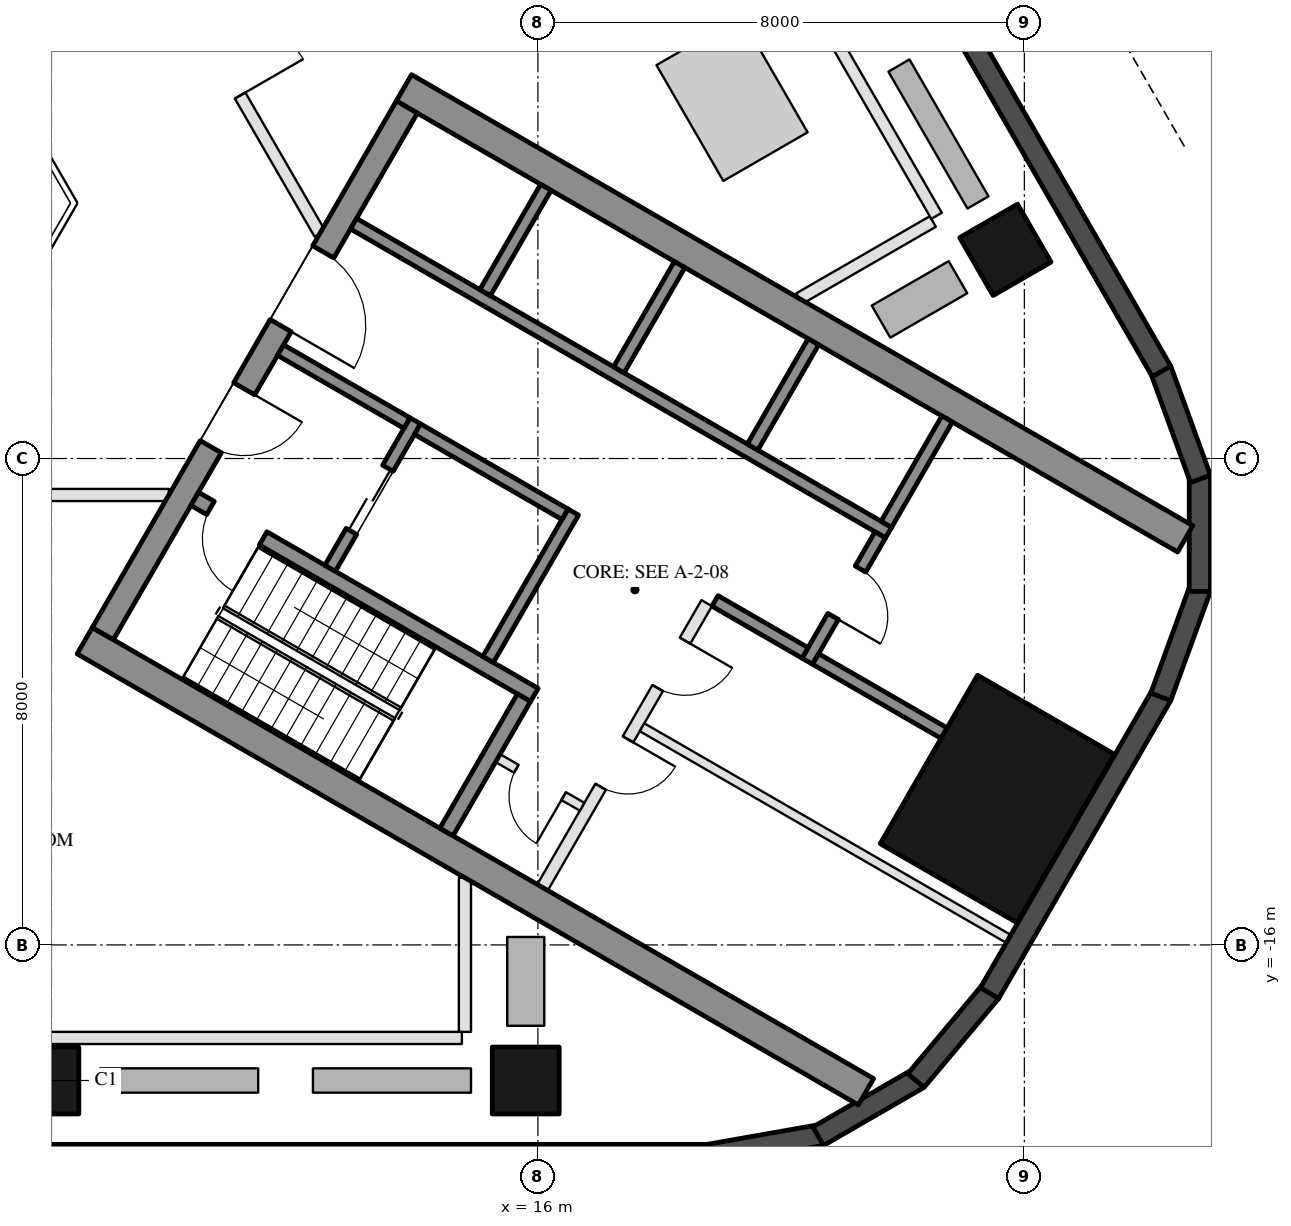
"""IFC4 building model, lengths in metres.
Left out: names, types, materials, properties, quantities, classifications, styles, units other than length and angle.
Written with IfcOpenShell. Run it as: python <this file> out.ifc"""

import sys

from ifc_helpers import new_model, si_unit, direction, frame, frame_2d, origin, origin_2d, place, context, subcontext, project, spatial, rectangle, hollow_rectangle, extrude, element, fill, save


model = new_model("IFC4")
c1 = context("Model", 3, precision=1e-05, world=origin(), true_north=direction((0.0, 1.0)))
c2 = subcontext(c1, "Body", "Model", "MODEL_VIEW")
j1 = project(units=[si_unit("LENGTHUNIT", "METRE"), si_unit("PLANEANGLEUNIT", "RADIAN")], contexts=[c1])
p1 = place(None, origin())
s1 = spatial("IfcSite", under=j1, at=p1, CompositionType="ELEMENT")
p2 = place(p1, origin())
s2 = spatial("IfcBuilding", under=s1, at=p2, CompositionType="ELEMENT")
p3 = place(p2, frame((0.0, 0.0, 42.0)))
s3 = spatial("IfcBuildingStorey", under=s2, at=p3, CompositionType="ELEMENT", Elevation=42.0)
for number, where, z_axis, x_axis in (
    (1, (7.9, -18.23, 0.0), (0.0, 0.0, 1.0), (-1.0, 0.0, 0.0)),
    (2, (15.8, -18.23, 0.0), (0.0, 0.0, 1.0), (-1.0, 0.0, 0.0)),
    (3, (23.688, -4.568, 0.0), (0.0, 0.0, 1.0), (-0.5, 0.866, 0.0)),
):
    element("IfcColumn", number, at=place(p3, frame(where, z_axis=z_axis, x_axis=x_axis)), inside=s3, PredefinedType="COLUMN", context=c2, shape_type="SweptSolid", body=[
        extrude(hollow_rectangle(XDim=1.1, YDim=1.1, WallThickness=0.05, at=origin_2d()), origin(), (0.0, 0.0, 1.0), 4.5),
    ])
p4 = place(p3, frame((23.556, -13.6, 0.0), z_axis=(0.0, 0.0, 1.0), x_axis=(0.5, 0.866025403784, 0.0)))
e4 = element("IfcColumn", 4, at=p4, inside=s3, PredefinedType="COLUMN", context=c2, shape_type="SweptSolid", body=[
    extrude(hollow_rectangle(XDim=3.2, YDim=2.6, WallThickness=0.08, at=origin_2d()), origin(), (0.0, 0.0, 1.0), 4.5),
])
p5 = place(p3, frame((-18.816, -19.455, 0.0), z_axis=(0.0, 0.0, 1.0), x_axis=(1.0, 0.0, 0.0)))
e5 = element("IfcWall", 5, at=p5, inside=s3, PredefinedType="SOLIDWALL", context=c2, shape_type="SweptSolid", body=[
    extrude(rectangle(XDim=37.632, YDim=0.35, at=frame_2d((18.816, 0.0))), origin(), (0.0, 0.0, 1.0), 4.35),
])
p6 = place(p3, frame((18.785, -19.458, 0.0), z_axis=(0.0, 0.0, 1.0), x_axis=(0.984798995425, 0.173697837091, 0.0)))
e6 = element("IfcWall", 6, at=p6, inside=s3, PredefinedType="SOLIDWALL", context=c2, shape_type="SweptSolid", body=[
    extrude(rectangle(XDim=1.91, YDim=0.35, at=frame_2d((0.955, 0.0))), origin(), (0.0, 0.0, 1.0), 4.35),
])
for number, where, z_axis, x_axis in (
    (7, (20.61, -19.147, 0.0), (0.0, 0.0, 1.0), (0.866, 0.5, 0.0)),
    (8, (22.217, -18.231, 0.0), (0.0, 0.0, 1.0), (0.643, 0.766, 0.0)),
):
    element("IfcWall", number, at=place(p3, frame(where, z_axis=z_axis, x_axis=x_axis)), inside=s3, PredefinedType="SOLIDWALL", context=c2, shape_type="SweptSolid", body=[
        extrude(rectangle(XDim=1.91, YDim=0.35, at=frame_2d((0.955, 0.0))), origin(), (0.0, 0.0, 1.0), 4.35),
    ])
p7 = place(p3, frame((23.427, -16.792, 0.0), z_axis=(0.0, 0.0, 1.0), x_axis=(0.499986410639, 0.866033249463, 0.0)))
e9 = element("IfcWall", 9, at=p7, inside=s3, PredefinedType="SOLIDWALL", context=c2, shape_type="SweptSolid", body=[
    extrude(rectangle(XDim=5.658, YDim=0.35, at=frame_2d((2.829, 0.0))), origin(), (0.0, 0.0, 1.0), 4.35),
])
for number, where, z_axis, x_axis in (
    (10, (26.244, -11.92, 0.0), (0.0, 0.0, 1.0), (0.342, 0.94, 0.0)),
    (11, (26.886, -10.185, 0.0), (0.0, 0.0, 1.0), (0.0, 1.0, 0.0)),
    (12, (26.897, -8.335, 0.0), (0.0, 0.0, 1.0), (-0.342, 0.94, 0.0)),
):
    element("IfcWall", number, at=place(p3, frame(where, z_axis=z_axis, x_axis=x_axis)), inside=s3, PredefinedType="SOLIDWALL", context=c2, shape_type="SweptSolid", body=[
        extrude(rectangle(XDim=1.91, YDim=0.35, at=frame_2d((0.955, 0.0))), origin(), (0.0, 0.0, 1.0), 4.35),
    ])
p8 = place(p3, frame((26.256, -6.567, 0.0), z_axis=(0.0, 0.0, 1.0), x_axis=(-0.499998380999, 0.866026338513, 0.0)))
e13 = element("IfcWall", 13, at=p8, inside=s3, PredefinedType="SOLIDWALL", context=c2, shape_type="SweptSolid", body=[
    extrude(rectangle(XDim=37.631, YDim=0.35, at=frame_2d((18.816, 0.0))), origin(), (0.0, 0.0, 1.0), 4.35),
])
for number, where, z_axis, x_axis in (
    (14, (8.547, -10.997, 0.0), (0.0, 0.0, 1.0), (0.866, -0.5, 0.0)),
    (15, (13.797, -1.903, 0.0), (0.0, 0.0, 1.0), (0.866, -0.5, 0.0)),
):
    element("IfcWall", number, at=place(p3, frame(where, z_axis=z_axis, x_axis=x_axis)), inside=s3, PredefinedType="SHEAR", context=c2, shape_type="SweptSolid", body=[
        extrude(rectangle(XDim=14.837, YDim=0.5, at=frame_2d((7.418, 0.0))), origin(), (0.0, 0.0, 1.0), 4.3),
    ])
p9 = place(p3, frame((8.845, -10.88, 0.0), z_axis=(0.0, 0.0, 1.0), x_axis=(0.500004234368, 0.866022959057, 0.0)))
e16 = element("IfcWall", 16, at=p9, inside=s3, PredefinedType="SHEAR", context=c2, shape_type="SweptSolid", body=[
    extrude(rectangle(XDim=10.0, YDim=0.4, at=frame_2d((5.0, 0.0))), origin(), (0.0, 0.0, 1.0), 4.3),
])
p10 = place(p9, frame((3.55, 0.0, 0.0)))
e17 = element("IfcOpeningElement", 17, at=p10, cuts=e16, PredefinedType="OPENING", context=c2, shape_type="SweptSolid", body=[
    extrude(rectangle(XDim=1.1, YDim=2.1, at=frame_2d((0.55, 1.05))), frame((0.0, 0.21, 0.0), z_axis=(0.0, -1.0, 0.0), x_axis=(1.0, 0.0, 0.0)), (0.0, 0.0, 1.0), 0.42),
])
p11 = place(p9, frame((5.85, 0.0, 0.0)))
e18 = element("IfcOpeningElement", 18, at=p11, cuts=e16, PredefinedType="OPENING", context=c2, shape_type="SweptSolid", body=[
    extrude(rectangle(XDim=1.4, YDim=2.1, at=frame_2d((0.7, 1.05))), frame((0.0, 0.21, 0.0), z_axis=(0.0, -1.0, 0.0), x_axis=(1.0, 0.0, 0.0)), (0.0, 0.0, 1.0), 0.42),
])
p12 = place(p3, frame((10.356, -8.664, 0.0), z_axis=(0.0, 0.0, 1.0), x_axis=(0.866028629588, -0.499994412703, 0.0)))
e19 = element("IfcWall", 19, at=p12, inside=s3, PredefinedType="SHEAR", context=c2, shape_type="SweptSolid", body=[
    extrude(rectangle(XDim=6.45, YDim=0.25, at=frame_2d((3.225, 0.0))), origin(), (0.0, 0.0, 1.0), 4.3),
])
p13 = place(p12, frame((0.3, 0.0, 0.0)))
e20 = element("IfcOpeningElement", 20, at=p13, cuts=e19, PredefinedType="OPENING", context=c2, shape_type="SweptSolid", body=[
    extrude(rectangle(XDim=1.0, YDim=2.1, at=frame_2d((0.5, 1.05))), frame((0.0, 0.135, 0.0), z_axis=(0.0, -1.0, 0.0), x_axis=(1.0, 0.0, 0.0)), (0.0, 0.0, 1.0), 0.27),
])
p14 = place(p3, frame((14.496, -14.143, 0.0), z_axis=(0.0, 0.0, 1.0), x_axis=(0.500062241894, 0.865989465428, 0.0)))
e21 = element("IfcWall", 21, at=p14, inside=s3, PredefinedType="SHEAR", context=c2, shape_type="SweptSolid", body=[
    extrude(rectangle(XDim=2.55, YDim=0.25, at=frame_2d((1.275, 0.0))), origin(), (0.0, 0.0, 1.0), 4.3),
])
p15 = place(p3, frame((15.181, -11.305, 0.0), z_axis=(0.0, 0.0, 1.0), x_axis=(0.49994636267, 0.866056369097, 0.0)))
e22 = element("IfcWall", 22, at=p15, inside=s3, PredefinedType="SHEAR", context=c2, shape_type="SweptSolid", body=[
    extrude(rectangle(XDim=2.8, YDim=0.2, at=frame_2d((1.4, 0.0))), origin(), (0.0, 0.0, 1.0), 4.3),
])
p16 = place(p3, frame((12.583, -9.805, 0.0), z_axis=(0.0, 0.0, 1.0), x_axis=(0.49994636267, 0.866056369097, 0.0)))
e23 = element("IfcWall", 23, at=p16, inside=s3, PredefinedType="SHEAR", context=c2, shape_type="SweptSolid", body=[
    extrude(rectangle(XDim=2.8, YDim=0.2, at=frame_2d((1.4, 0.0))), origin(), (0.0, 0.0, 1.0), 4.3),
])
p17 = place(p16, frame((0.7, 0.0, 0.0)))
e24 = element("IfcOpeningElement", 24, at=p17, cuts=e23, PredefinedType="OPENING", context=c2, shape_type="SweptSolid", body=[
    extrude(rectangle(XDim=1.2, YDim=2.1, at=frame_2d((0.6, 1.05))), frame((0.0, 0.11, 0.0), z_axis=(0.0, -1.0, 0.0), x_axis=(1.0, 0.0, 0.0)), (0.0, 0.0, 1.0), 0.22),
])
p18 = place(p3, frame((11.768, -6.217, 0.0), z_axis=(0.0, 0.0, 1.0), x_axis=(0.866050077142, -0.499957262057, 0.0)))
e25 = element("IfcWall", 25, at=p18, inside=s3, PredefinedType="SHEAR", context=c2, shape_type="SweptSolid", body=[
    extrude(rectangle(XDim=2.4, YDim=0.2, at=frame_2d((1.2, 0.0))), origin(), (0.0, 0.0, 1.0), 4.3),
])
p19 = place(p3, frame((14.02, -7.517, 0.0), z_axis=(0.0, 0.0, 1.0), x_axis=(0.866034573852, -0.49998411664, 0.0)))
e26 = element("IfcWall", 26, at=p19, inside=s3, PredefinedType="SHEAR", context=c2, shape_type="SweptSolid", body=[
    extrude(rectangle(XDim=2.8, YDim=0.2, at=frame_2d((1.4, 0.0))), origin(), (0.0, 0.0, 1.0), 4.3),
])
p20 = place(p3, frame((12.968, -4.138, 0.0), z_axis=(0.0, 0.0, 1.0), x_axis=(0.866028328073, -0.49999493495, 0.0)))
e27 = element("IfcWall", 27, at=p20, inside=s3, PredefinedType="SHEAR", context=c2, shape_type="SweptSolid", body=[
    extrude(rectangle(XDim=10.16, YDim=0.2, at=frame_2d((5.08, 0.0))), origin(), (0.0, 0.0, 1.0), 4.3),
])
p21 = place(p3, frame((20.43, -11.333, 0.0), z_axis=(0.0, 0.0, 1.0), x_axis=(0.500001309137, 0.866024647952, 0.0)))
e28 = element("IfcWall", 28, at=p21, inside=s3, PredefinedType="SHEAR", context=c2, shape_type="SweptSolid", body=[
    extrude(rectangle(XDim=2.4, YDim=0.2, at=frame_2d((1.2, 0.0))), origin(), (0.0, 0.0, 1.0), 4.3),
])
p22 = place(p21, frame((0.85, 0.0, 0.0)))
e29 = element("IfcOpeningElement", 29, at=p22, cuts=e28, PredefinedType="OPENING", context=c2, shape_type="SweptSolid", body=[
    extrude(rectangle(XDim=0.9, YDim=2.1, at=frame_2d((0.45, 1.05))), frame((0.0, 0.11, 0.0), z_axis=(0.0, -1.0, 0.0), x_axis=(1.0, 0.0, 0.0)), (0.0, 0.0, 1.0), 0.22),
])
p23 = place(p3, frame((18.913, -10.342, 0.0), z_axis=(0.0, 0.0, 1.0), x_axis=(0.866038183914, -0.499977863513, 0.0)))
e30 = element("IfcWall", 30, at=p23, inside=s3, PredefinedType="SHEAR", context=c2, shape_type="SweptSolid", body=[
    extrude(rectangle(XDim=1.71, YDim=0.2, at=frame_2d((0.855, 0.0))), origin(), (0.0, 0.0, 1.0), 4.3),
])
for number, where, z_axis, x_axis in (
    (31, (15.131, -5.272, 0.0), (0.0, 0.0, 1.0), (0.5, 0.866, 0.0)),
    (32, (17.331, -6.542, 0.0), (0.0, 0.0, 1.0), (0.5, 0.866, 0.0)),
    (33, (19.531, -7.812, 0.0), (0.0, 0.0, 1.0), (0.5, 0.866, 0.0)),
    (34, (21.73, -9.082, 0.0), (0.0, 0.0, 1.0), (0.5, 0.866, 0.0)),
):
    element("IfcWall", number, at=place(p3, frame(where, z_axis=z_axis, x_axis=x_axis)), inside=s3, PredefinedType="SHEAR", context=c2, shape_type="SweptSolid", body=[
        extrude(rectangle(XDim=2.0, YDim=0.2, at=frame_2d((1.0, 0.0))), origin(), (0.0, 0.0, 1.0), 4.3),
    ])
p24 = place(p3, frame((20.567, -11.297, 0.0), z_axis=(0.0, 0.0, 1.0), x_axis=(0.866048967903, -0.499959183527, 0.0)))
e35 = element("IfcWall", 35, at=p24, inside=s3, PredefinedType="SHEAR", context=c2, shape_type="SweptSolid", body=[
    extrude(rectangle(XDim=2.44, YDim=0.2, at=frame_2d((1.22, 0.0))), origin(), (0.0, 0.0, 1.0), 4.3),
])
p25 = place(p3, frame((16.076, -15.055, 0.0), z_axis=(0.0, 0.0, 1.0), x_axis=(0.499995103361, 0.866028230842, 0.0)))
e36 = element("IfcWall", 36, at=p25, inside=s3, PredefinedType="PARTITIONING", context=c2, shape_type="SweptSolid", body=[
    extrude(rectangle(XDim=5.4, YDim=0.2, at=frame_2d((2.7, 0.0))), origin(), (0.0, 0.0, 1.0), 4.3),
])
p26 = place(p25, frame((1.913, 0.0, 0.0)))
e37 = element("IfcOpeningElement", 37, at=p26, cuts=e36, PredefinedType="OPENING", context=c2, shape_type="SweptSolid", body=[
    extrude(rectangle(XDim=0.9, YDim=2.1, at=frame_2d((0.45, 1.05))), frame((0.0, 0.11, 0.0), z_axis=(0.0, -1.0, 0.0), x_axis=(1.0, 0.0, 0.0)), (0.0, 0.0, 1.0), 0.22),
])
p27 = place(p25, frame((3.788, 0.0, 0.0)))
e38 = element("IfcOpeningElement", 38, at=p27, cuts=e36, PredefinedType="OPENING", context=c2, shape_type="SweptSolid", body=[
    extrude(rectangle(XDim=0.9, YDim=2.1, at=frame_2d((0.45, 1.05))), frame((0.0, 0.11, 0.0), z_axis=(0.0, -1.0, 0.0), x_axis=(1.0, 0.0, 0.0)), (0.0, 0.0, 1.0), 0.22),
])
p28 = place(p3, frame((15.342, -12.928, 0.0), z_axis=(0.0, 0.0, 1.0), x_axis=(0.865989903783, -0.500061482766, 0.0)))
e39 = element("IfcWall", 39, at=p28, inside=s3, PredefinedType="PARTITIONING", context=c2, shape_type="SweptSolid", body=[
    extrude(rectangle(XDim=1.6, YDim=0.15, at=frame_2d((0.8, 0.0))), origin(), (0.0, 0.0, 1.0), 4.3),
])
p29 = place(p28, frame((0.35, 0.0, 0.0)))
e40 = element("IfcOpeningElement", 40, at=p29, cuts=e39, PredefinedType="OPENING", context=c2, shape_type="SweptSolid", body=[
    extrude(rectangle(XDim=0.9, YDim=2.1, at=frame_2d((0.45, 1.05))), frame((0.0, 0.085, 0.0), z_axis=(0.0, -1.0, 0.0), x_axis=(1.0, 0.0, 0.0)), (0.0, 0.0, 1.0), 0.17),
])
p30 = place(p3, frame((17.713, -12.42, 0.0), z_axis=(0.0, 0.0, 1.0), x_axis=(0.866016523273, -0.500015381182, 0.0)))
e41 = element("IfcWall", 41, at=p30, inside=s3, PredefinedType="PARTITIONING", context=c2, shape_type="SweptSolid", body=[
    extrude(rectangle(XDim=6.95, YDim=0.15, at=frame_2d((3.475, 0.0))), origin(), (0.0, 0.0, 1.0), 4.3),
])
p31 = place(p3, frame((14.8, -17.43, 0.0), z_axis=(0.0, 0.0, 1.0), x_axis=(0.0, 1.0, 0.0)))
e42 = element("IfcWall", 42, at=p31, inside=s3, PredefinedType="PARTITIONING", context=c2, shape_type="SweptSolid", body=[
    extrude(rectangle(XDim=2.534, YDim=0.2, at=frame_2d((1.267, 0.0))), origin(), (0.0, 0.0, 1.0), 4.35),
])
p32 = place(p3, frame((-14.75, -17.53, 0.0), z_axis=(0.0, 0.0, 1.0), x_axis=(1.0, 0.0, 0.0)))
e43 = element("IfcWall", 43, at=p32, inside=s3, PredefinedType="PARTITIONING", context=c2, shape_type="SweptSolid", body=[
    extrude(rectangle(XDim=29.5, YDim=0.2, at=frame_2d((14.75, 0.0))), origin(), (0.0, 0.0, 1.0), 3.75),
])
p33 = place(p3, frame((-9.93, -8.6, 0.0), z_axis=(0.0, 0.0, 1.0), x_axis=(1.0, 0.0, 0.0)))
e44 = element("IfcWall", 44, at=p33, inside=s3, PredefinedType="PARTITIONING", context=c2, shape_type="SweptSolid", body=[
    extrude(rectangle(XDim=19.861, YDim=0.2, at=frame_2d((9.93, 0.0))), origin(), (0.0, 0.0, 1.0), 3.75),
])
p34 = place(p33, frame((2.121, 0.0, 0.0)))
e45 = element("IfcOpeningElement", 45, at=p34, cuts=e44, PredefinedType="OPENING", context=c2, shape_type="SweptSolid", body=[
    extrude(rectangle(XDim=1.2, YDim=2.1, at=frame_2d((0.6, 1.05))), frame((0.0, 0.11, 0.0), z_axis=(0.0, -1.0, 0.0), x_axis=(1.0, 0.0, 0.0)), (0.0, 0.0, 1.0), 0.22),
])
p35 = place(p33, frame((8.331, 0.0, 0.0)))
e46 = element("IfcOpeningElement", 46, at=p35, cuts=e44, PredefinedType="OPENING", context=c2, shape_type="SweptSolid", body=[
    extrude(rectangle(XDim=1.2, YDim=2.1, at=frame_2d((0.6, 1.05))), frame((0.0, 0.11, 0.0), z_axis=(0.0, -1.0, 0.0), x_axis=(1.0, 0.0, 0.0)), (0.0, 0.0, 1.0), 0.22),
])
p36 = place(p33, frame((15.54, 0.0, 0.0)))
e47 = element("IfcOpeningElement", 47, at=p36, cuts=e44, PredefinedType="OPENING", context=c2, shape_type="SweptSolid", body=[
    extrude(rectangle(XDim=1.2, YDim=2.1, at=frame_2d((0.6, 1.05))), frame((0.0, 0.11, 0.0), z_axis=(0.0, -1.0, 0.0), x_axis=(1.0, 0.0, 0.0)), (0.0, 0.0, 1.0), 0.22),
])
p37 = place(p3, frame((22.495, -4.102, 0.0), z_axis=(0.0, 0.0, 1.0), x_axis=(-0.866065287345, -0.499930913282, 0.0)))
e48 = element("IfcWall", 48, at=p37, inside=s3, PredefinedType="PARTITIONING", context=c2, shape_type="SweptSolid", body=[
    extrude(rectangle(XDim=2.534, YDim=0.2, at=frame_2d((1.267, 0.0))), origin(), (0.0, 0.0, 1.0), 4.35),
])
p38 = place(p3, frame((22.556, -4.009, 0.0), z_axis=(0.0, 0.0, 1.0), x_axis=(-0.500002084189, 0.866024200474, 0.0)))
e49 = element("IfcWall", 49, at=p38, inside=s3, PredefinedType="PARTITIONING", context=c2, shape_type="SweptSolid", body=[
    extrude(rectangle(XDim=29.5, YDim=0.2, at=frame_2d((14.75, 0.0))), origin(), (0.0, 0.0, 1.0), 3.75),
])
p39 = place(p3, frame((12.413, -4.3, 0.0), z_axis=(0.0, 0.0, 1.0), x_axis=(-0.50000478328, 0.866022642139, 0.0)))
e50 = element("IfcWall", 50, at=p39, inside=s3, PredefinedType="PARTITIONING", context=c2, shape_type="SweptSolid", body=[
    extrude(rectangle(XDim=19.861, YDim=0.2, at=frame_2d((9.931, 0.0))), origin(), (0.0, 0.0, 1.0), 3.75),
])
p40 = place(p39, frame((2.621, 0.0, 0.0)))
e51 = element("IfcOpeningElement", 51, at=p40, cuts=e50, PredefinedType="OPENING", context=c2, shape_type="SweptSolid", body=[
    extrude(rectangle(XDim=1.2, YDim=2.1, at=frame_2d((0.6, 1.05))), frame((0.0, 0.11, 0.0), z_axis=(0.0, -1.0, 0.0), x_axis=(1.0, 0.0, 0.0)), (0.0, 0.0, 1.0), 0.22),
])
p41 = place(p39, frame((9.081, 0.0, 0.0)))
e52 = element("IfcOpeningElement", 52, at=p41, cuts=e50, PredefinedType="OPENING", context=c2, shape_type="SweptSolid", body=[
    extrude(rectangle(XDim=1.2, YDim=2.1, at=frame_2d((0.6, 1.05))), frame((0.0, 0.11, 0.0), z_axis=(0.0, -1.0, 0.0), x_axis=(1.0, 0.0, 0.0)), (0.0, 0.0, 1.0), 0.22),
])
p42 = place(p39, frame((15.79, 0.0, 0.0)))
e53 = element("IfcOpeningElement", 53, at=p42, cuts=e50, PredefinedType="OPENING", context=c2, shape_type="SweptSolid", body=[
    extrude(rectangle(XDim=1.2, YDim=2.1, at=frame_2d((0.6, 1.05))), frame((0.0, 0.11, 0.0), z_axis=(0.0, -1.0, 0.0), x_axis=(1.0, 0.0, 0.0)), (0.0, 0.0, 1.0), 0.22),
])
p43 = place(p17, origin())
e54 = element("IfcDoor", 54, at=p43, inside=s3, OperationType="DOUBLE_DOOR_SLIDING", PredefinedType="DOOR", context=c2, shape_type="SweptSolid", body=[
    extrude(rectangle(XDim=1.2, YDim=2.1, at=frame_2d((0.6, 1.05))), frame((0.0, 0.025, 0.0), z_axis=(0.0, -1.0, 0.0), x_axis=(1.0, 0.0, 0.0)), (0.0, 0.0, 1.0), 0.05),
])
fill(e24, e54)
p44 = place(p29, frame((0.9, 0.0, 0.0), z_axis=(0.0, 0.0, 1.0), x_axis=(-1.0, 0.0, 0.0)))
e55 = element("IfcDoor", 55, at=p44, inside=s3, OperationType="SINGLE_SWING_LEFT", PredefinedType="DOOR", context=c2, shape_type="SweptSolid", body=[
    extrude(rectangle(XDim=0.9, YDim=2.1, at=frame_2d((0.45, 1.05))), frame((0.0, 0.025, 0.0), z_axis=(0.0, -1.0, 0.0), x_axis=(1.0, 0.0, 0.0)), (0.0, 0.0, 1.0), 0.05),
])
fill(e40, e55)
p45 = place(p22, frame((0.9, 0.0, 0.0), z_axis=(0.0, 0.0, 1.0), x_axis=(-1.0, 0.0, 0.0)))
e56 = element("IfcDoor", 56, at=p45, inside=s3, OperationType="SINGLE_SWING_RIGHT", PredefinedType="DOOR", context=c2, shape_type="SweptSolid", body=[
    extrude(rectangle(XDim=0.9, YDim=2.1, at=frame_2d((0.45, 1.05))), frame((0.0, 0.025, 0.0), z_axis=(0.0, -1.0, 0.0), x_axis=(1.0, 0.0, 0.0)), (0.0, 0.0, 1.0), 0.05),
])
fill(e29, e56)
p46 = place(p26, frame((0.9, 0.0, 0.0), z_axis=(0.0, 0.0, 1.0), x_axis=(-1.0, 0.0, 0.0)))
e57 = element("IfcDoor", 57, at=p46, inside=s3, OperationType="SINGLE_SWING_LEFT", PredefinedType="DOOR", context=c2, shape_type="SweptSolid", body=[
    extrude(rectangle(XDim=0.9, YDim=2.1, at=frame_2d((0.45, 1.05))), frame((0.0, 0.025, 0.0), z_axis=(0.0, -1.0, 0.0), x_axis=(1.0, 0.0, 0.0)), (0.0, 0.0, 1.0), 0.05),
])
fill(e37, e57)
p47 = place(p27, frame((0.9, 0.0, 0.0), z_axis=(0.0, 0.0, 1.0), x_axis=(-1.0, 0.0, 0.0)))
e58 = element("IfcDoor", 58, at=p47, inside=s3, OperationType="SINGLE_SWING_LEFT", PredefinedType="DOOR", context=c2, shape_type="SweptSolid", body=[
    extrude(rectangle(XDim=0.9, YDim=2.1, at=frame_2d((0.45, 1.05))), frame((0.0, 0.025, 0.0), z_axis=(0.0, -1.0, 0.0), x_axis=(1.0, 0.0, 0.0)), (0.0, 0.0, 1.0), 0.05),
])
fill(e38, e58)
p48 = place(p10, frame((1.1, 0.0, 0.0), z_axis=(0.0, 0.0, 1.0), x_axis=(-1.0, 0.0, 0.0)))
e59 = element("IfcDoor", 59, at=p48, inside=s3, OperationType="SINGLE_SWING_LEFT", PredefinedType="DOOR", context=c2, shape_type="SweptSolid", body=[
    extrude(rectangle(XDim=1.1, YDim=2.1, at=frame_2d((0.55, 1.05))), frame((0.0, 0.025, 0.0), z_axis=(0.0, -1.0, 0.0), x_axis=(1.0, 0.0, 0.0)), (0.0, 0.0, 1.0), 0.05),
])
fill(e17, e59)
p49 = place(p11, frame((1.4, 0.0, 0.0), z_axis=(0.0, 0.0, 1.0), x_axis=(-1.0, 0.0, 0.0)))
e60 = element("IfcDoor", 60, at=p49, inside=s3, OperationType="DOUBLE_DOOR_SINGLE_SWING", PredefinedType="DOOR", context=c2, shape_type="SweptSolid", body=[
    extrude(rectangle(XDim=1.4, YDim=2.1, at=frame_2d((0.7, 1.05))), frame((0.0, 0.025, 0.0), z_axis=(0.0, -1.0, 0.0), x_axis=(1.0, 0.0, 0.0)), (0.0, 0.0, 1.0), 0.05),
])
fill(e18, e60)
p50 = place(p13, frame((1.0, 0.0, 0.0), z_axis=(0.0, 0.0, 1.0), x_axis=(-1.0, 0.0, 0.0)))
e61 = element("IfcDoor", 61, at=p50, inside=s3, OperationType="SINGLE_SWING_LEFT", PredefinedType="DOOR", context=c2, shape_type="SweptSolid", body=[
    extrude(rectangle(XDim=1.0, YDim=2.1, at=frame_2d((0.5, 1.05))), frame((0.0, 0.025, 0.0), z_axis=(0.0, -1.0, 0.0), x_axis=(1.0, 0.0, 0.0)), (0.0, 0.0, 1.0), 0.05),
])
fill(e20, e61)
p51 = place(p40, frame((1.2, 0.0, 0.0), z_axis=(0.0, 0.0, 1.0), x_axis=(-1.0, 0.0, 0.0)))
e62 = element("IfcDoor", 62, at=p51, inside=s3, OperationType="SINGLE_SWING_RIGHT", PredefinedType="DOOR", context=c2, shape_type="SweptSolid", body=[
    extrude(rectangle(XDim=1.2, YDim=2.1, at=frame_2d((0.6, 1.05))), frame((0.0, 0.025, 0.0), z_axis=(0.0, -1.0, 0.0), x_axis=(1.0, 0.0, 0.0)), (0.0, 0.0, 1.0), 0.05),
])
fill(e51, e62)
save(model, sys.argv[1])
